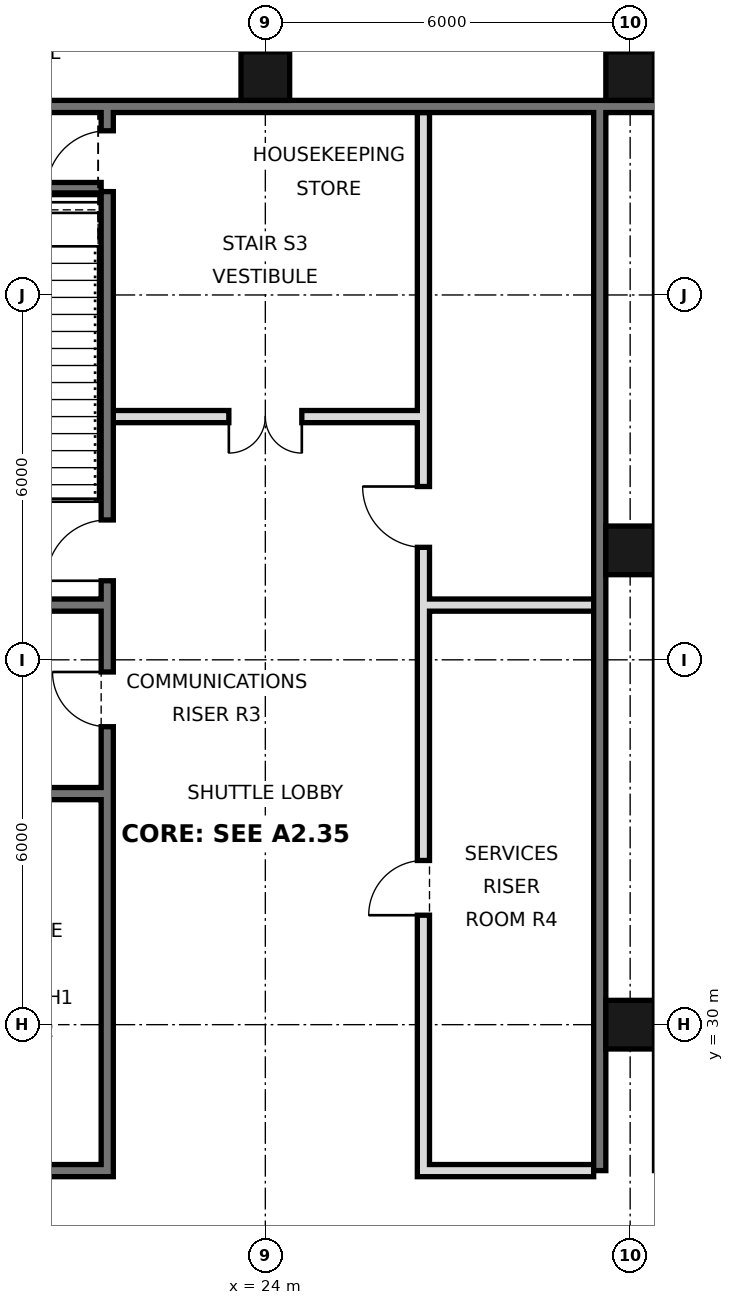
"""IFC4 building model, lengths in metres.
Left out: names, types, materials, properties, quantities, classifications, styles, units other than length and angle.
Written with IfcOpenShell. Run it as: python <this file> out.ifc"""

import sys

from ifc_helpers import new_model, si_unit, direction, frame, frame_2d, origin, origin_2d, place, context, subcontext, project, spatial, rectangle, hollow_rectangle, extrude, element, fill, save


model = new_model("IFC4")
c1 = context("Model", 3, precision=1e-05, world=origin(), true_north=direction((0.0, 1.0)))
c2 = subcontext(c1, "Body", "Model", "MODEL_VIEW")
j1 = project(units=[si_unit("LENGTHUNIT", "METRE"), si_unit("PLANEANGLEUNIT", "RADIAN")], contexts=[c1])
p1 = place(None, origin())
s1 = spatial("IfcSite", under=j1, at=p1, CompositionType="ELEMENT")
p2 = place(p1, origin())
s2 = spatial("IfcBuilding", under=s1, at=p2, CompositionType="ELEMENT")
p3 = place(p2, frame((0.0, 0.0, 138.4)))
s3 = spatial("IfcBuildingStorey", under=s2, at=p3, CompositionType="ELEMENT", Elevation=138.4)
for number, where, z_axis, x_axis in (
    (1, (24.0, 45.6, 0.0), (0.0, 0.0, 1.0), (1.0, 0.0, 0.0)),
    (2, (30.0, 30.0, 0.0), (0.0, 0.0, 1.0), (1.0, 0.0, 0.0)),
    (3, (30.0, 37.8, 0.0), (0.0, 0.0, 1.0), (1.0, 0.0, 0.0)),
    (4, (30.0, 45.6, 0.0), (0.0, 0.0, 1.0), (1.0, 0.0, 0.0)),
):
    element("IfcColumn", number, at=place(p3, frame(where, z_axis=z_axis, x_axis=x_axis)), inside=s3, PredefinedType="COLUMN", context=c2, shape_type="SweptSolid", body=[
        extrude(hollow_rectangle(XDim=0.8, YDim=0.8, WallThickness=0.05, at=origin_2d()), origin(), (0.0, 0.0, 1.0), 5.4),
    ])
p4 = place(p3, frame((6.6, 45.1, 0.0), z_axis=(0.0, 0.0, 1.0), x_axis=(1.0, 0.0, 0.0)))
e5 = element("IfcWall", 5, at=p4, inside=s3, PredefinedType="SOLIDWALL", context=c2, shape_type="SweptSolid", body=[
    extrude(rectangle(XDim=34.8, YDim=0.2, at=frame_2d((17.4, 0.0))), origin(), (0.0, 0.0, 1.0), 5.22),
])
p5 = place(p3, frame((29.5, 27.6, 0.0), z_axis=(0.0, 0.0, 1.0), x_axis=(0.0, 1.0, 0.0)))
e6 = element("IfcWall", 6, at=p5, inside=s3, PredefinedType="SOLIDWALL", context=c2, shape_type="SweptSolid", body=[
    extrude(rectangle(XDim=17.5, YDim=0.2, at=frame_2d((8.75, 0.0))), origin(), (0.0, 0.0, 1.0), 5.22),
])
p6 = place(p3, frame((21.4, 27.5, 0.0), z_axis=(0.0, 0.0, 1.0), x_axis=(0.0, 1.0, 0.0)))
e7 = element("IfcWall", 7, at=p6, inside=s3, PredefinedType="SOLIDWALL", context=c2, shape_type="SweptSolid", body=[
    extrude(rectangle(XDim=17.5, YDim=0.2, at=frame_2d((8.75, 0.0))), origin(), (0.0, 0.0, 1.0), 5.22),
])
p7 = place(p6, frame((16.2, 0.0, 0.0)))
e8 = element("IfcOpeningElement", 8, at=p7, cuts=e7, PredefinedType="OPENING", context=c2, shape_type="SweptSolid", body=[
    extrude(rectangle(XDim=1.0, YDim=2.1, at=frame_2d((0.5, 1.05))), frame((0.0, 0.11, 0.0), z_axis=(0.0, -1.0, 0.0), x_axis=(1.0, 0.0, 0.0)), (0.0, 0.0, 1.0), 0.22),
])
p8 = place(p6, frame((9.8, 0.0, 0.0)))
e9 = element("IfcOpeningElement", 9, at=p8, cuts=e7, PredefinedType="OPENING", context=c2, shape_type="SweptSolid", body=[
    extrude(rectangle(XDim=1.0, YDim=2.1, at=frame_2d((0.5, 1.05))), frame((0.0, 0.11, 0.0), z_axis=(0.0, -1.0, 0.0), x_axis=(1.0, 0.0, 0.0)), (0.0, 0.0, 1.0), 0.22),
])
p9 = place(p6, frame((7.4, 0.0, 0.0)))
e10 = element("IfcOpeningElement", 10, at=p9, cuts=e7, PredefinedType="OPENING", context=c2, shape_type="SweptSolid", body=[
    extrude(rectangle(XDim=0.9, YDim=2.1, at=frame_2d((0.45, 1.05))), frame((0.0, 0.11, 0.0), z_axis=(0.0, -1.0, 0.0), x_axis=(1.0, 0.0, 0.0)), (0.0, 0.0, 1.0), 0.22),
])
p10 = place(p3, frame((26.6, 27.5, 0.0), z_axis=(0.0, 0.0, 1.0), x_axis=(0.0, 1.0, 0.0)))
e11 = element("IfcWall", 11, at=p10, inside=s3, PredefinedType="SOLIDWALL", context=c2, shape_type="SweptSolid", body=[
    extrude(rectangle(XDim=17.5, YDim=0.2, at=frame_2d((8.75, 0.0))), origin(), (0.0, 0.0, 1.0), 5.22),
])
p11 = place(p10, frame((4.3, 0.0, 0.0)))
e12 = element("IfcOpeningElement", 12, at=p11, cuts=e11, PredefinedType="OPENING", context=c2, shape_type="SweptSolid", body=[
    extrude(rectangle(XDim=0.9, YDim=2.1, at=frame_2d((0.45, 1.05))), frame((0.0, 0.11, 0.0), z_axis=(0.0, -1.0, 0.0), x_axis=(1.0, 0.0, 0.0)), (0.0, 0.0, 1.0), 0.22),
])
p12 = place(p10, frame((10.35, 0.0, 0.0)))
e13 = element("IfcOpeningElement", 13, at=p12, cuts=e11, PredefinedType="OPENING", context=c2, shape_type="SweptSolid", body=[
    extrude(rectangle(XDim=1.0, YDim=2.1, at=frame_2d((0.5, 1.05))), frame((0.0, 0.11, 0.0), z_axis=(0.0, -1.0, 0.0), x_axis=(1.0, 0.0, 0.0)), (0.0, 0.0, 1.0), 0.22),
])
for number, where, z_axis, x_axis in (
    (14, (18.6, 27.6, 0.0), (0.0, 0.0, 1.0), (1.0, 0.0, 0.0)),
    (15, (26.7, 27.6, 0.0), (0.0, 0.0, 1.0), (1.0, 0.0, 0.0)),
    (16, (18.6, 33.8, 0.0), (0.0, 0.0, 1.0), (1.0, 0.0, 0.0)),
    (17, (18.6, 36.9, 0.0), (0.0, 0.0, 1.0), (1.0, 0.0, 0.0)),
    (18, (26.7, 36.9, 0.0), (0.0, 0.0, 1.0), (1.0, 0.0, 0.0)),
):
    element("IfcWall", number, at=place(p3, frame(where, z_axis=z_axis, x_axis=x_axis)), inside=s3, PredefinedType="SOLIDWALL", context=c2, shape_type="SweptSolid", body=[
        extrude(rectangle(XDim=2.7, YDim=0.2, at=frame_2d((1.35, 0.0))), origin(), (0.0, 0.0, 1.0), 5.22),
    ])
p13 = place(p3, frame((21.5, 40.0, 0.0), z_axis=(0.0, 0.0, 1.0), x_axis=(1.0, 0.0, 0.0)))
e19 = element("IfcWall", 19, at=p13, inside=s3, PredefinedType="PARTITIONING", context=c2, shape_type="SweptSolid", body=[
    extrude(rectangle(XDim=5.0, YDim=0.2, at=frame_2d((2.5, 0.0))), origin(), (0.0, 0.0, 1.0), 5.22),
])
p14 = place(p13, frame((1.9, 0.0, 0.0)))
e20 = element("IfcOpeningElement", 20, at=p14, cuts=e19, PredefinedType="OPENING", context=c2, shape_type="SweptSolid", body=[
    extrude(rectangle(XDim=1.2, YDim=2.1, at=frame_2d((0.6, 1.05))), frame((0.0, 0.11, 0.0), z_axis=(0.0, -1.0, 0.0), x_axis=(1.0, 0.0, 0.0)), (0.0, 0.0, 1.0), 0.22),
])
p15 = place(p3, frame((18.6, 43.75, 0.0), z_axis=(0.0, 0.0, 1.0), x_axis=(1.0, 0.0, 0.0)))
e21 = element("IfcWall", 21, at=p15, inside=s3, PredefinedType="SOLIDWALL", context=c2, shape_type="SweptSolid", body=[
    extrude(rectangle(XDim=2.7, YDim=0.2, at=frame_2d((1.35, 0.0))), origin(), (0.0, 0.0, 1.0), 2.5),
])
p16 = place(p14, frame((1.2, 0.0, 0.0), z_axis=(0.0, 0.0, 1.0), x_axis=(-1.0, 0.0, 0.0)))
e22 = element("IfcDoor", 22, at=p16, inside=s3, OperationType="DOUBLE_DOOR_SINGLE_SWING", PredefinedType="DOOR", context=c2, shape_type="SweptSolid", body=[
    extrude(rectangle(XDim=1.2, YDim=2.1, at=frame_2d((0.6, 1.05))), frame((0.0, 0.025, 0.0), z_axis=(0.0, -1.0, 0.0), x_axis=(1.0, 0.0, 0.0)), (0.0, 0.0, 1.0), 0.05),
])
fill(e20, e22)
p17 = place(p7, origin())
e23 = element("IfcDoor", 23, at=p17, inside=s3, OperationType="SINGLE_SWING_LEFT", PredefinedType="DOOR", context=c2, shape_type="SweptSolid", body=[
    extrude(rectangle(XDim=1.0, YDim=2.1, at=frame_2d((0.5, 1.05))), frame((0.0, 0.025, 0.0), z_axis=(0.0, -1.0, 0.0), x_axis=(1.0, 0.0, 0.0)), (0.0, 0.0, 1.0), 0.05),
])
fill(e8, e23)
p18 = place(p8, origin())
e24 = element("IfcDoor", 24, at=p18, inside=s3, OperationType="SINGLE_SWING_LEFT", PredefinedType="DOOR", context=c2, shape_type="SweptSolid", body=[
    extrude(rectangle(XDim=1.0, YDim=2.1, at=frame_2d((0.5, 1.05))), frame((0.0, 0.025, 0.0), z_axis=(0.0, -1.0, 0.0), x_axis=(1.0, 0.0, 0.0)), (0.0, 0.0, 1.0), 0.05),
])
fill(e9, e24)
p19 = place(p9, frame((0.9, 0.0, 0.0), z_axis=(0.0, 0.0, 1.0), x_axis=(-1.0, 0.0, 0.0)))
e25 = element("IfcDoor", 25, at=p19, inside=s3, OperationType="SINGLE_SWING_LEFT", PredefinedType="DOOR", context=c2, shape_type="SweptSolid", body=[
    extrude(rectangle(XDim=0.9, YDim=2.1, at=frame_2d((0.45, 1.05))), frame((0.0, 0.025, 0.0), z_axis=(0.0, -1.0, 0.0), x_axis=(1.0, 0.0, 0.0)), (0.0, 0.0, 1.0), 0.05),
])
fill(e10, e25)
p20 = place(p11, origin())
e26 = element("IfcDoor", 26, at=p20, inside=s3, OperationType="SINGLE_SWING_LEFT", PredefinedType="DOOR", context=c2, shape_type="SweptSolid", body=[
    extrude(rectangle(XDim=0.9, YDim=2.1, at=frame_2d((0.45, 1.05))), frame((0.0, 0.025, 0.0), z_axis=(0.0, -1.0, 0.0), x_axis=(1.0, 0.0, 0.0)), (0.0, 0.0, 1.0), 0.05),
])
fill(e12, e26)
p21 = place(p12, frame((1.0, 0.0, 0.0), z_axis=(0.0, 0.0, 1.0), x_axis=(-1.0, 0.0, 0.0)))
e27 = element("IfcDoor", 27, at=p21, inside=s3, OperationType="SINGLE_SWING_LEFT", PredefinedType="DOOR", context=c2, shape_type="SweptSolid", body=[
    extrude(rectangle(XDim=1.0, YDim=2.1, at=frame_2d((0.5, 1.05))), frame((0.0, 0.025, 0.0), z_axis=(0.0, -1.0, 0.0), x_axis=(1.0, 0.0, 0.0)), (0.0, 0.0, 1.0), 0.05),
])
fill(e13, e27)
save(model, sys.argv[1])
